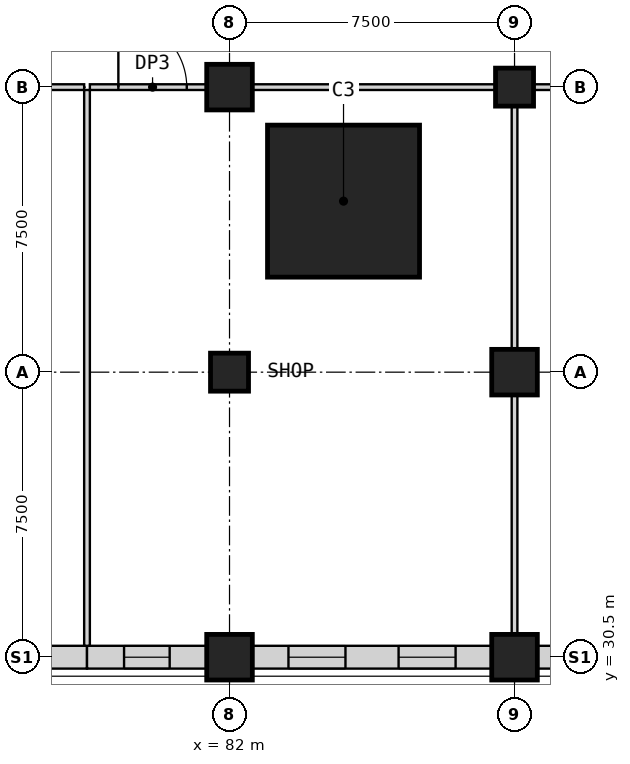
"""IFC4 building model, lengths in metres.
Left out: names, types, materials, properties, quantities, classifications, styles, units other than length and angle.
Written with IfcOpenShell. Run it as: python <this file> out.ifc"""

import sys

from ifc_helpers import new_model, si_unit, direction, frame, frame_2d, origin, origin_2d, place, context, subcontext, project, spatial, rectangle, extrude, element, fill, save


model = new_model("IFC4")
c1 = context("Model", 3, precision=1e-05, world=origin(), true_north=direction((0.0, 1.0)))
c2 = subcontext(c1, "Body", "Model", "MODEL_VIEW")
j1 = project(units=[si_unit("LENGTHUNIT", "METRE"), si_unit("PLANEANGLEUNIT", "RADIAN")], contexts=[c1])
p1 = place(None, origin())
s1 = spatial("IfcSite", under=j1, at=p1, CompositionType="ELEMENT")
p2 = place(p1, origin())
s2 = spatial("IfcBuilding", under=s1, at=p2, CompositionType="ELEMENT")
p3 = place(p2, frame((0.0, 0.0, 13.5)))
s3 = spatial("IfcBuildingStorey", under=s2, at=p3, CompositionType="ELEMENT", Elevation=13.5)
p4 = place(p3, frame((82.0, 38.0, 0.0), z_axis=(0.0, 0.0, 1.0), x_axis=(1.0, 0.0, 0.0)))
e1 = element("IfcColumn", 1, at=p4, inside=s3, PredefinedType="COLUMN", context=c2, shape_type="SweptSolid", body=[
    extrude(rectangle(XDim=1.0, YDim=1.0, at=origin_2d()), origin(), (0.0, 0.0, 1.0), 5.0),
])
p5 = place(p3, frame((82.0, 45.5, 0.0), z_axis=(0.0, 0.0, 1.0), x_axis=(1.0, 0.0, 0.0)))
e2 = element("IfcColumn", 2, at=p5, inside=s3, PredefinedType="COLUMN", context=c2, shape_type="SweptSolid", body=[
    extrude(rectangle(XDim=1.2, YDim=1.2, at=origin_2d()), origin(), (0.0, 0.0, 1.0), 5.0),
])
p6 = place(p3, frame((89.5, 45.5, 0.0), z_axis=(0.0, 0.0, 1.0), x_axis=(1.0, 0.0, 0.0)))
e3 = element("IfcColumn", 3, at=p6, inside=s3, PredefinedType="COLUMN", context=c2, shape_type="SweptSolid", body=[
    extrude(rectangle(XDim=1.0, YDim=1.0, at=origin_2d()), origin(), (0.0, 0.0, 1.0), 5.0),
])
p7 = place(p3, frame((85.0, 42.5, 0.0), z_axis=(0.0, 0.0, 1.0), x_axis=(1.0, 0.0, 0.0)))
e4 = element("IfcColumn", 4, at=p7, inside=s3, PredefinedType="COLUMN", context=c2, shape_type="SweptSolid", body=[
    extrude(rectangle(XDim=4.0, YDim=4.0, at=origin_2d()), origin(), (0.0, 0.0, 1.0), 5.0),
])
for number, where, z_axis, x_axis in (
    (5, (82.0, 30.5, 0.0), (0.0, 0.0, 1.0), (1.0, 0.0, 0.0)),
    (6, (89.5, 30.5, 0.0), (0.0, 0.0, 1.0), (1.0, 0.0, 0.0)),
    (7, (89.5, 38.0, 0.0), (0.0, 0.0, 1.0), (1.0, 0.0, 0.0)),
):
    element("IfcColumn", number, at=place(p3, frame(where, z_axis=z_axis, x_axis=x_axis)), inside=s3, PredefinedType="COLUMN", context=c2, shape_type="SweptSolid", body=[
        extrude(rectangle(XDim=1.2, YDim=1.2, at=origin_2d()), origin(), (0.0, 0.0, 1.0), 5.0),
    ])
p8 = place(p3, frame((75.1, 30.5, 0.0), z_axis=(0.0, 0.0, 1.0), x_axis=(1.0, 0.0, 0.0)))
e8 = element("IfcWall", 8, at=p8, inside=s3, PredefinedType="PARTITIONING", context=c2, shape_type="SweptSolid", body=[
    extrude(rectangle(XDim=3.15, YDim=0.6, at=frame_2d((1.575, 0.0))), origin(), (0.0, 0.0, 1.0), 4.1),
])
p9 = place(p8, frame((0.975, 0.0, 0.9)))
e9 = element("IfcOpeningElement", 9, at=p9, cuts=e8, PredefinedType="OPENING", context=c2, shape_type="SweptSolid", body=[
    extrude(rectangle(XDim=1.2, YDim=2.8, at=frame_2d((0.6, 1.4))), frame((0.0, 0.31, 0.0), z_axis=(0.0, -1.0, 0.0), x_axis=(1.0, 0.0, 0.0)), (0.0, 0.0, 1.0), 0.62),
])
p10 = place(p3, frame((78.25, 30.5, 0.0), z_axis=(0.0, 0.0, 1.0), x_axis=(1.0, 0.0, 0.0)))
e10 = element("IfcWall", 10, at=p10, inside=s3, PredefinedType="PARTITIONING", context=c2, shape_type="SweptSolid", body=[
    extrude(rectangle(XDim=3.15, YDim=0.6, at=frame_2d((1.575, 0.0))), origin(), (0.0, 0.0, 1.0), 4.1),
])
p11 = place(p10, frame((0.975, 0.0, 0.9)))
e11 = element("IfcOpeningElement", 11, at=p11, cuts=e10, PredefinedType="OPENING", context=c2, shape_type="SweptSolid", body=[
    extrude(rectangle(XDim=1.2, YDim=2.8, at=frame_2d((0.6, 1.4))), frame((0.0, 0.31, 0.0), z_axis=(0.0, -1.0, 0.0), x_axis=(1.0, 0.0, 0.0)), (0.0, 0.0, 1.0), 0.62),
])
p12 = place(p3, frame((82.6, 30.5, 0.0), z_axis=(0.0, 0.0, 1.0), x_axis=(1.0, 0.0, 0.0)))
e12 = element("IfcWall", 12, at=p12, inside=s3, PredefinedType="PARTITIONING", context=c2, shape_type="SweptSolid", body=[
    extrude(rectangle(XDim=6.3, YDim=0.6, at=frame_2d((3.15, 0.0))), origin(), (0.0, 0.0, 1.0), 4.1),
])
p13 = place(p12, frame((0.951, 0.0, 0.9)))
e13 = element("IfcOpeningElement", 13, at=p13, cuts=e12, PredefinedType="OPENING", context=c2, shape_type="SweptSolid", body=[
    extrude(rectangle(XDim=1.5, YDim=2.8, at=frame_2d((0.75, 1.4))), frame((0.0, 0.31, 0.0), z_axis=(0.0, -1.0, 0.0), x_axis=(1.0, 0.0, 0.0)), (0.0, 0.0, 1.0), 0.62),
])
p14 = place(p12, frame((3.849, 0.0, 0.9)))
e14 = element("IfcOpeningElement", 14, at=p14, cuts=e12, PredefinedType="OPENING", context=c2, shape_type="SweptSolid", body=[
    extrude(rectangle(XDim=1.5, YDim=2.8, at=frame_2d((0.75, 1.4))), frame((0.0, 0.31, 0.0), z_axis=(0.0, -1.0, 0.0), x_axis=(1.0, 0.0, 0.0)), (0.0, 0.0, 1.0), 0.62),
])
p15 = place(p3, frame((90.1, 30.5, 0.0), z_axis=(0.0, 0.0, 1.0), x_axis=(1.0, 0.0, 0.0)))
e15 = element("IfcWall", 15, at=p15, inside=s3, PredefinedType="PARTITIONING", context=c2, shape_type="SweptSolid", body=[
    extrude(rectangle(XDim=6.3, YDim=0.6, at=frame_2d((3.15, 0.0))), origin(), (0.0, 0.0, 1.0), 4.1),
])
p16 = place(p15, frame((0.951, 0.0, 0.9)))
e16 = element("IfcOpeningElement", 16, at=p16, cuts=e15, PredefinedType="OPENING", context=c2, shape_type="SweptSolid", body=[
    extrude(rectangle(XDim=1.5, YDim=2.8, at=frame_2d((0.75, 1.4))), frame((0.0, 0.31, 0.0), z_axis=(0.0, -1.0, 0.0), x_axis=(1.0, 0.0, 0.0)), (0.0, 0.0, 1.0), 0.62),
])
p17 = place(p15, frame((3.849, 0.0, 0.9)))
e17 = element("IfcOpeningElement", 17, at=p17, cuts=e15, PredefinedType="OPENING", context=c2, shape_type="SweptSolid", body=[
    extrude(rectangle(XDim=1.5, YDim=2.8, at=frame_2d((0.75, 1.4))), frame((0.0, 0.31, 0.0), z_axis=(0.0, -1.0, 0.0), x_axis=(1.0, 0.0, 0.0)), (0.0, 0.0, 1.0), 0.62),
])
p18 = place(p3, frame((75.1, 45.5, 0.0), z_axis=(0.0, 0.0, 1.0), x_axis=(1.0, 0.0, 0.0)))
e18 = element("IfcWall", 18, at=p18, inside=s3, PredefinedType="PARTITIONING", context=c2, shape_type="SweptSolid", body=[
    extrude(rectangle(XDim=3.075, YDim=0.15, at=frame_2d((1.538, 0.0))), origin(), (0.0, 0.0, 1.0), 4.7),
])
p19 = place(p3, frame((78.325, 45.5, 0.0), z_axis=(0.0, 0.0, 1.0), x_axis=(1.0, 0.0, 0.0)))
e19 = element("IfcWall", 19, at=p19, inside=s3, PredefinedType="PARTITIONING", context=c2, shape_type="SweptSolid", body=[
    extrude(rectangle(XDim=3.075, YDim=0.15, at=frame_2d((1.538, 0.0))), origin(), (0.0, 0.0, 1.0), 4.7),
])
p20 = place(p19, frame((0.75, 0.0, 0.0)))
e20 = element("IfcOpeningElement", 20, at=p20, cuts=e19, PredefinedType="OPENING", context=c2, shape_type="SweptSolid", body=[
    extrude(rectangle(XDim=1.8, YDim=2.4, at=frame_2d((0.9, 1.2))), frame((0.0, 0.085, 0.0), z_axis=(0.0, -1.0, 0.0), x_axis=(1.0, 0.0, 0.0)), (0.0, 0.0, 1.0), 0.17),
])
for number, where, z_axis, x_axis in (
    (21, (82.6, 45.5, 0.0), (0.0, 0.0, 1.0), (1.0, 0.0, 0.0)),
    (22, (90.0, 45.5, 0.0), (0.0, 0.0, 1.0), (1.0, 0.0, 0.0)),
):
    element("IfcWall", number, at=place(p3, frame(where, z_axis=z_axis, x_axis=x_axis)), inside=s3, PredefinedType="PARTITIONING", context=c2, shape_type="SweptSolid", body=[
        extrude(rectangle(XDim=6.4, YDim=0.15, at=frame_2d((3.2, 0.0))), origin(), (0.0, 0.0, 1.0), 4.7),
    ])
p21 = place(p3, frame((78.25, 30.8, 0.0), z_axis=(0.0, 0.0, 1.0), x_axis=(0.0, 1.0, 0.0)))
e23 = element("IfcWall", 23, at=p21, inside=s3, PredefinedType="PARTITIONING", context=c2, shape_type="SweptSolid", body=[
    extrude(rectangle(XDim=14.625, YDim=0.15, at=frame_2d((7.312, 0.0))), origin(), (0.0, 0.0, 1.0), 4.7),
])
p22 = place(p3, frame((89.5, 31.1, 0.0), z_axis=(0.0, 0.0, 1.0), x_axis=(0.0, 1.0, 0.0)))
e24 = element("IfcWall", 24, at=p22, inside=s3, PredefinedType="PARTITIONING", context=c2, shape_type="SweptSolid", body=[
    extrude(rectangle(XDim=6.3, YDim=0.15, at=frame_2d((3.15, 0.0))), origin(), (0.0, 0.0, 1.0), 4.7),
])
p23 = place(p3, frame((89.5, 38.6, 0.0), z_axis=(0.0, 0.0, 1.0), x_axis=(0.0, 1.0, 0.0)))
e25 = element("IfcWall", 25, at=p23, inside=s3, PredefinedType="PARTITIONING", context=c2, shape_type="SweptSolid", body=[
    extrude(rectangle(XDim=6.4, YDim=0.15, at=frame_2d((3.2, 0.0))), origin(), (0.0, 0.0, 1.0), 4.7),
])
p24 = place(p11, origin())
e26 = element("IfcWindow", 26, at=p24, inside=s3, PartitioningType="SINGLE_PANEL", PredefinedType="WINDOW", context=c2, shape_type="SweptSolid", body=[
    extrude(rectangle(XDim=1.2, YDim=2.8, at=frame_2d((0.6, 1.4))), frame((0.0, 0.03, 0.0), z_axis=(0.0, -1.0, 0.0), x_axis=(1.0, 0.0, 0.0)), (0.0, 0.0, 1.0), 0.06),
])
fill(e11, e26)
p25 = place(p13, origin())
e27 = element("IfcWindow", 27, at=p25, inside=s3, PartitioningType="SINGLE_PANEL", PredefinedType="WINDOW", context=c2, shape_type="SweptSolid", body=[
    extrude(rectangle(XDim=1.5, YDim=2.8, at=frame_2d((0.75, 1.4))), frame((0.0, 0.03, 0.0), z_axis=(0.0, -1.0, 0.0), x_axis=(1.0, 0.0, 0.0)), (0.0, 0.0, 1.0), 0.06),
])
fill(e13, e27)
p26 = place(p14, origin())
e28 = element("IfcWindow", 28, at=p26, inside=s3, PartitioningType="SINGLE_PANEL", PredefinedType="WINDOW", context=c2, shape_type="SweptSolid", body=[
    extrude(rectangle(XDim=1.5, YDim=2.8, at=frame_2d((0.75, 1.4))), frame((0.0, 0.03, 0.0), z_axis=(0.0, -1.0, 0.0), x_axis=(1.0, 0.0, 0.0)), (0.0, 0.0, 1.0), 0.06),
])
fill(e14, e28)
p27 = place(p20, origin())
e29 = element("IfcDoor", 29, at=p27, inside=s3, OperationType="SINGLE_SWING_LEFT", PredefinedType="DOOR", context=c2, shape_type="SweptSolid", body=[
    extrude(rectangle(XDim=1.8, YDim=2.4, at=frame_2d((0.9, 1.2))), frame((0.0, 0.025, 0.0), z_axis=(0.0, -1.0, 0.0), x_axis=(1.0, 0.0, 0.0)), (0.0, 0.0, 1.0), 0.05),
])
fill(e20, e29)
save(model, sys.argv[1])
